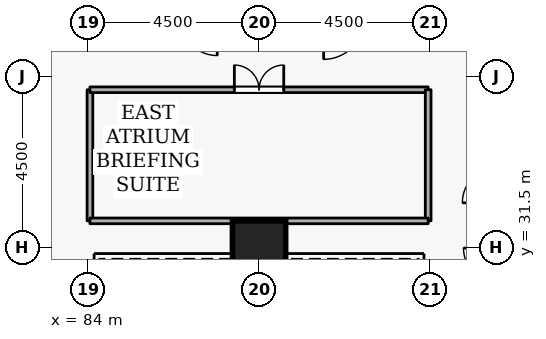
"""IFC4 building model, lengths in metres.
Left out: names, types, materials, properties, quantities, classifications, styles, units other than length and angle.
Written with IfcOpenShell. Run it as: python <this file> out.ifc"""

import sys

from ifc_helpers import new_model, si_unit, direction, frame, frame_2d, origin, origin_2d, place, context, subcontext, project, spatial, rectangle, extrude, element, fill, save


model = new_model("IFC4")
c1 = context("Model", 3, precision=1e-05, world=origin(), true_north=direction((0.0, 1.0)))
c2 = subcontext(c1, "Body", "Model", "MODEL_VIEW")
j1 = project(units=[si_unit("LENGTHUNIT", "METRE"), si_unit("PLANEANGLEUNIT", "RADIAN")], contexts=[c1])
p1 = place(None, origin())
s1 = spatial("IfcSite", under=j1, at=p1, CompositionType="ELEMENT")
p2 = place(p1, origin())
s2 = spatial("IfcBuilding", under=s1, at=p2, CompositionType="ELEMENT")
p3 = place(p2, frame((0.0, 0.0, 68.1)))
s3 = spatial("IfcBuildingStorey", under=s2, at=p3, CompositionType="ELEMENT", Elevation=68.1)
p4 = place(p3, frame((88.5, 31.5, 0.0), z_axis=(0.0, 0.0, 1.0), x_axis=(1.0, 0.0, 0.0)))
e1 = element("IfcColumn", 1, at=p4, inside=s3, PredefinedType="COLUMN", context=c2, shape_type="SweptSolid", body=[
    extrude(rectangle(XDim=1.4, YDim=1.4, at=origin_2d()), origin(), (0.0, 0.0, 1.0), 3.6),
])
p5 = place(p3, frame((84.05, 32.2, 0.0), z_axis=(0.0, 0.0, 1.0), x_axis=(0.0, 1.0, 0.0)))
e2 = element("IfcWall", 2, at=p5, inside=s3, PredefinedType="PARTITIONING", context=c2, shape_type="SweptSolid", body=[
    extrude(rectangle(XDim=3.45, YDim=0.15, at=frame_2d((1.725, 0.0))), origin(), (0.0, 0.0, 1.0), 3.26),
])
p6 = place(p3, frame((84.05, 35.65, 0.0), z_axis=(0.0, 0.0, 1.0), x_axis=(1.0, 0.0, 0.0)))
e3 = element("IfcWall", 3, at=p6, inside=s3, PredefinedType="PARTITIONING", context=c2, shape_type="SweptSolid", body=[
    extrude(rectangle(XDim=8.9, YDim=0.15, at=frame_2d((4.45, 0.0))), origin(), (0.0, 0.0, 1.0), 3.26),
])
p7 = place(p6, frame((3.8, 0.0, 0.0)))
e4 = element("IfcOpeningElement", 4, at=p7, cuts=e3, PredefinedType="OPENING", context=c2, shape_type="SweptSolid", body=[
    extrude(rectangle(XDim=1.3, YDim=2.12, at=frame_2d((0.65, 1.06))), frame((0.0, 0.085, 0.0), z_axis=(0.0, -1.0, 0.0), x_axis=(1.0, 0.0, 0.0)), (0.0, 0.0, 1.0), 0.17),
])
p8 = place(p3, frame((92.95, 35.65, 0.0), z_axis=(0.0, 0.0, 1.0), x_axis=(0.0, -1.0, 0.0)))
e5 = element("IfcWall", 5, at=p8, inside=s3, PredefinedType="PARTITIONING", context=c2, shape_type="SweptSolid", body=[
    extrude(rectangle(XDim=3.45, YDim=0.15, at=frame_2d((1.725, 0.0))), origin(), (0.0, 0.0, 1.0), 3.26),
])
p9 = place(p3, frame((92.95, 32.2, 0.0), z_axis=(0.0, 0.0, 1.0), x_axis=(-1.0, 0.0, 0.0)))
e6 = element("IfcWall", 6, at=p9, inside=s3, PredefinedType="PARTITIONING", context=c2, shape_type="SweptSolid", body=[
    extrude(rectangle(XDim=8.9, YDim=0.15, at=frame_2d((4.45, 0.0))), origin(), (0.0, 0.0, 1.0), 3.26),
])
p10 = place(p7, origin())
e7 = element("IfcDoor", 7, at=p10, inside=s3, OperationType="DOUBLE_DOOR_SINGLE_SWING", PredefinedType="DOOR", context=c2, shape_type="SweptSolid", body=[
    extrude(rectangle(XDim=1.3, YDim=2.12, at=frame_2d((0.65, 1.06))), frame((0.0, 0.025, 0.0), z_axis=(0.0, -1.0, 0.0), x_axis=(1.0, 0.0, 0.0)), (0.0, 0.0, 1.0), 0.05),
])
fill(e4, e7)
save(model, sys.argv[1])
